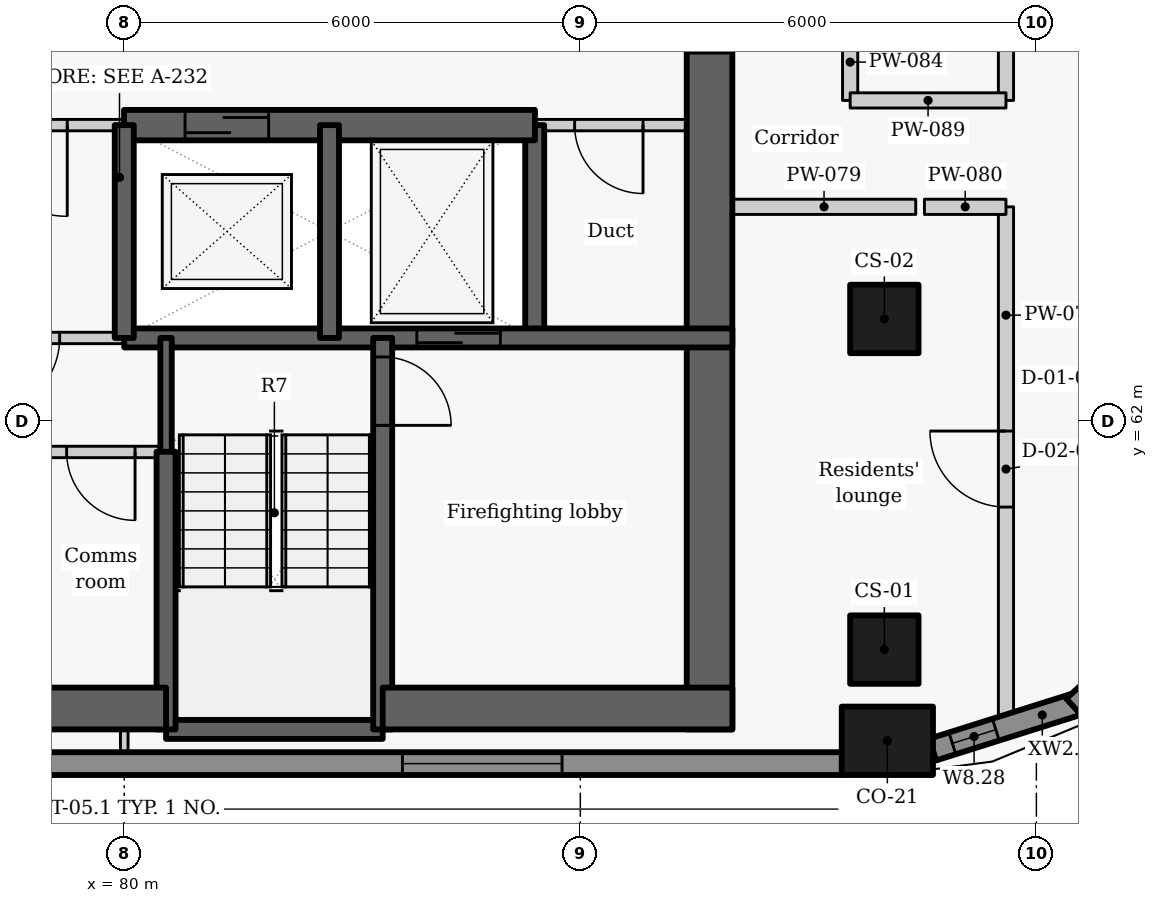
"""IFC4 building model, lengths in metres.
Left out: names, types, materials, properties, quantities, classifications, styles, units other than length and angle.
Written with IfcOpenShell. Run it as: python <this file> out.ifc"""

import sys

from ifc_helpers import new_model, si_unit, direction, frame, frame_2d, origin, origin_2d, place, context, subcontext, project, spatial, rectangle, extrude, element, fill, save


model = new_model("IFC4")
c1 = context("Model", 3, precision=1e-05, world=origin(), true_north=direction((0.0, 1.0)))
c2 = subcontext(c1, "Body", "Model", "MODEL_VIEW")
j1 = project(units=[si_unit("LENGTHUNIT", "METRE"), si_unit("PLANEANGLEUNIT", "RADIAN")], contexts=[c1])
p1 = place(None, origin())
s1 = spatial("IfcSite", under=j1, at=p1, CompositionType="ELEMENT")
p2 = place(p1, origin())
s2 = spatial("IfcBuilding", under=s1, at=p2, CompositionType="ELEMENT")
p3 = place(p2, frame((0.0, 0.0, 180.0)))
s3 = spatial("IfcBuildingStorey", under=s2, at=p3, CompositionType="ELEMENT", Elevation=180.0)
p4 = place(p3, frame((90.04, 57.8, 0.0), z_axis=(0.0, 0.0, 1.0), x_axis=(1.0, 0.0, 0.0)))
e1 = element("IfcColumn", 1, at=p4, inside=s3, PredefinedType="COLUMN", context=c2, shape_type="SweptSolid", body=[
    extrude(rectangle(XDim=1.2, YDim=0.9, at=origin_2d()), origin(), (0.0, 0.0, 1.0), 3.3),
])
for number, where, z_axis, x_axis in (
    (2, (90.0, 59.0, 0.0), (0.0, 0.0, 1.0), (0.0, 1.0, 0.0)),
    (3, (90.0, 63.35, 0.0), (0.0, 0.0, 1.0), (0.0, 1.0, 0.0)),
):
    element("IfcColumn", number, at=place(p3, frame(where, z_axis=z_axis, x_axis=x_axis)), inside=s3, PredefinedType="COLUMN", context=c2, shape_type="SweptSolid", body=[
        extrude(rectangle(XDim=0.9, YDim=0.9, at=origin_2d()), origin(), (0.0, 0.0, 1.0), 3.3),
    ])
p5 = place(p3, frame((70.551, 57.5, 0.0), z_axis=(0.0, 0.0, 1.0), x_axis=(1.0, 0.0, 0.0)))
e4 = element("IfcWall", 4, at=p5, inside=s3, PredefinedType="SOLIDWALL", context=c2, shape_type="SweptSolid", body=[
    extrude(rectangle(XDim=18.893, YDim=0.3, at=frame_2d((9.446, 0.0))), origin(), (0.0, 0.0, 1.0), 2.425),
])
p6 = place(p5, frame((3.687, 0.0, 0.9)))
e5 = element("IfcOpeningElement", 5, at=p6, cuts=e4, PredefinedType="OPENING", context=c2, shape_type="SweptSolid", body=[
    extrude(rectangle(XDim=2.1, YDim=1.1, at=frame_2d((1.05, 0.55))), frame((0.0, 0.16, 0.0), z_axis=(0.0, -1.0, 0.0), x_axis=(1.0, 0.0, 0.0)), (0.0, 0.0, 1.0), 0.32),
])
p7 = place(p5, frame((13.109, 0.0, 0.9)))
e6 = element("IfcOpeningElement", 6, at=p7, cuts=e4, PredefinedType="OPENING", context=c2, shape_type="SweptSolid", body=[
    extrude(rectangle(XDim=2.1, YDim=1.1, at=frame_2d((1.05, 0.55))), frame((0.0, 0.16, 0.0), z_axis=(0.0, -1.0, 0.0), x_axis=(1.0, 0.0, 0.0)), (0.0, 0.0, 1.0), 0.32),
])
p8 = place(p3, frame((90.636, 57.685, 0.0), z_axis=(0.0, 0.0, 1.0), x_axis=(0.95368324118, 0.300812691707, 0.0)))
e7 = element("IfcWall", 7, at=p8, inside=s3, PredefinedType="SOLIDWALL", context=c2, shape_type="SweptSolid", body=[
    extrude(rectangle(XDim=2.053, YDim=0.3, at=frame_2d((1.027, 0.0))), origin(), (0.0, 0.0, 1.0), 2.425),
])
p9 = place(p8, frame((0.271, 0.0, 0.9)))
e8 = element("IfcOpeningElement", 8, at=p9, cuts=e7, PredefinedType="OPENING", context=c2, shape_type="SweptSolid", body=[
    extrude(rectangle(XDim=0.6, YDim=1.1, at=frame_2d((0.3, 0.55))), frame((0.0, 0.16, 0.0), z_axis=(0.0, -1.0, 0.0), x_axis=(1.0, 0.0, 0.0)), (0.0, 0.0, 1.0), 0.32),
])
p10 = place(p3, frame((92.494, 58.244, 0.0), z_axis=(0.0, 0.0, 1.0), x_axis=(0.73764876128, 0.675184645102, 0.0)))
e9 = element("IfcWall", 9, at=p10, inside=s3, PredefinedType="SOLIDWALL", context=c2, shape_type="SweptSolid", body=[
    extrude(rectangle(XDim=2.048, YDim=0.3, at=frame_2d((1.024, 0.0))), origin(), (0.0, 0.0, 1.0), 2.425),
])
p11 = place(p3, frame((85.4, 63.1, -0.275), z_axis=(0.0, 0.0, 1.0), x_axis=(0.0, 1.0, 0.0)))
e10 = element("IfcWall", 10, at=p11, inside=s3, PredefinedType="SHEAR", context=c2, shape_type="SweptSolid", body=[
    extrude(rectangle(XDim=2.8, YDim=0.25, at=frame_2d((1.4, 0.0))), origin(), (0.0, 0.0, 1.0), 3.3),
])
p12 = place(p3, frame((87.7, 72.2, -0.275), z_axis=(0.0, 0.0, 1.0), x_axis=(0.0, -1.0, 0.0)))
e11 = element("IfcWall", 11, at=p12, inside=s3, PredefinedType="SHEAR", context=c2, shape_type="SweptSolid", body=[
    extrude(rectangle(XDim=14.25, YDim=0.6, at=frame_2d((7.125, 0.0))), origin(), (0.0, 0.0, 1.0), 3.3),
])
p13 = place(p12, frame((3.852, 0.0, 0.275)))
e12 = element("IfcOpeningElement", 12, at=p13, cuts=e11, PredefinedType="OPENING", context=c2, shape_type="SweptSolid", body=[
    extrude(rectangle(XDim=1.5, YDim=2.1, at=frame_2d((0.75, 1.05))), frame((0.0, 0.31, 0.0), z_axis=(0.0, -1.0, 0.0), x_axis=(1.0, 0.0, 0.0)), (0.0, 0.0, 1.0), 0.62),
])
p14 = place(p3, frame((80.003, 65.9, 0.0), z_axis=(0.0, 0.0, 1.0), x_axis=(-1.0, 0.0, 0.0)))
e13 = element("IfcWall", 13, at=p14, inside=s3, PredefinedType="PARTITIONING", context=c2, shape_type="SweptSolid", body=[
    extrude(rectangle(XDim=2.706, YDim=0.15, at=frame_2d((1.353, 0.0))), origin(), (0.0, 0.0, 1.0), 3.025),
])
p15 = place(p14, frame((0.753, 0.0, 0.0)))
e14 = element("IfcOpeningElement", 14, at=p15, cuts=e13, PredefinedType="OPENING", context=c2, shape_type="SweptSolid", body=[
    extrude(rectangle(XDim=1.2, YDim=2.1, at=frame_2d((0.6, 1.05))), frame((0.0, 0.085, 0.0), z_axis=(0.0, -1.0, 0.0), x_axis=(1.0, 0.0, 0.0)), (0.0, 0.0, 1.0), 0.17),
])
p16 = place(p3, frame((88.0, 65.9, 0.0), z_axis=(0.0, 0.0, 1.0), x_axis=(-1.0, 0.0, 0.0)))
e15 = element("IfcWall", 15, at=p16, inside=s3, PredefinedType="PARTITIONING", context=c2, shape_type="SweptSolid", body=[
    extrude(rectangle(XDim=2.603, YDim=0.15, at=frame_2d((1.302, 0.0))), origin(), (0.0, 0.0, 1.0), 3.025),
])
p17 = place(p16, frame((1.175, 0.0, 0.0)))
e16 = element("IfcOpeningElement", 16, at=p17, cuts=e15, PredefinedType="OPENING", context=c2, shape_type="SweptSolid", body=[
    extrude(rectangle(XDim=0.9, YDim=2.1, at=frame_2d((0.45, 1.05))), frame((0.0, 0.085, 0.0), z_axis=(0.0, -1.0, 0.0), x_axis=(1.0, 0.0, 0.0)), (0.0, 0.0, 1.0), 0.17),
])
p18 = place(p3, frame((79.997, 65.9, -0.275), z_axis=(0.0, 0.0, 1.0), x_axis=(1.0, 0.0, 0.0)))
e17 = element("IfcWall", 17, at=p18, inside=s3, PredefinedType="SHEAR", context=c2, shape_type="SweptSolid", body=[
    extrude(rectangle(XDim=5.406, YDim=0.4, at=frame_2d((2.703, 0.0))), origin(), (0.0, 0.0, 1.0), 3.3),
])
p19 = place(p18, frame((0.803, 0.0, 0.275)))
e18 = element("IfcOpeningElement", 18, at=p19, cuts=e17, PredefinedType="OPENING", context=c2, shape_type="SweptSolid", body=[
    extrude(rectangle(XDim=1.1, YDim=2.1, at=frame_2d((0.55, 1.05))), frame((0.0, 0.21, 0.0), z_axis=(0.0, -1.0, 0.0), x_axis=(1.0, 0.0, 0.0)), (0.0, 0.0, 1.0), 0.42),
])
p20 = place(p3, frame((80.0, 63.1, -0.275), z_axis=(0.0, 0.0, 1.0), x_axis=(1.0, 0.0, 0.0)))
e19 = element("IfcWall", 19, at=p20, inside=s3, PredefinedType="SHEAR", context=c2, shape_type="SweptSolid", body=[
    extrude(rectangle(XDim=8.0, YDim=0.25, at=frame_2d((4.0, 0.0))), origin(), (0.0, 0.0, 1.0), 3.3),
])
p21 = place(p20, frame((3.849, 0.0, 0.275)))
e20 = element("IfcOpeningElement", 20, at=p21, cuts=e19, PredefinedType="OPENING", context=c2, shape_type="SweptSolid", body=[
    extrude(rectangle(XDim=1.1, YDim=2.1, at=frame_2d((0.55, 1.05))), frame((0.0, 0.135, 0.0), z_axis=(0.0, -1.0, 0.0), x_axis=(1.0, 0.0, 0.0)), (0.0, 0.0, 1.0), 0.27),
])
p22 = place(p3, frame((80.0, 63.1, -0.275), z_axis=(0.0, 0.0, 1.0), x_axis=(0.0, 1.0, 0.0)))
e21 = element("IfcWall", 21, at=p22, inside=s3, PredefinedType="SHEAR", context=c2, shape_type="SweptSolid", body=[
    extrude(rectangle(XDim=2.8, YDim=0.25, at=frame_2d((1.4, 0.0))), origin(), (0.0, 0.0, 1.0), 3.3),
])
p23 = place(p3, frame((80.0, 63.1, 0.0), z_axis=(0.0, 0.0, 1.0), x_axis=(-1.0, 0.0, 0.0)))
e22 = element("IfcWall", 22, at=p23, inside=s3, PredefinedType="PARTITIONING", context=c2, shape_type="SweptSolid", body=[
    extrude(rectangle(XDim=2.7, YDim=0.15, at=frame_2d((1.35, 0.0))), origin(), (0.0, 0.0, 1.0), 3.025),
])
p24 = place(p23, frame((0.85, 0.0, 0.0)))
e23 = element("IfcOpeningElement", 23, at=p24, cuts=e22, PredefinedType="OPENING", context=c2, shape_type="SweptSolid", body=[
    extrude(rectangle(XDim=1.0, YDim=2.1, at=frame_2d((0.5, 1.05))), frame((0.0, 0.085, 0.0), z_axis=(0.0, -1.0, 0.0), x_axis=(1.0, 0.0, 0.0)), (0.0, 0.0, 1.0), 0.17),
])
p25 = place(p3, frame((82.7, 63.1, -0.275), z_axis=(0.0, 0.0, 1.0), x_axis=(0.0, 1.0, 0.0)))
e24 = element("IfcWall", 24, at=p25, inside=s3, PredefinedType="SHEAR", context=c2, shape_type="SweptSolid", body=[
    extrude(rectangle(XDim=2.8, YDim=0.25, at=frame_2d((1.4, 0.0))), origin(), (0.0, 0.0, 1.0), 3.3),
])
p26 = place(p3, frame((80.55, 57.95, -0.275), z_axis=(0.0, 0.0, 1.0), x_axis=(1.0, 0.0, 0.0)))
e25 = element("IfcWall", 25, at=p26, inside=s3, PredefinedType="SHEAR", context=c2, shape_type="SweptSolid", body=[
    extrude(rectangle(XDim=2.85, YDim=0.25, at=frame_2d((1.425, 0.0))), origin(), (0.0, 0.0, 1.0), 3.3),
])
p27 = place(p3, frame((83.4, 63.1, -0.275), z_axis=(0.0, 0.0, 1.0), x_axis=(0.0, -1.0, 0.0)))
e26 = element("IfcWall", 26, at=p27, inside=s3, PredefinedType="SHEAR", context=c2, shape_type="SweptSolid", body=[
    extrude(rectangle(XDim=5.15, YDim=0.25, at=frame_2d((2.575, 0.0))), origin(), (0.0, 0.0, 1.0), 3.3),
])
p28 = place(p27, frame((0.25, 0.0, 0.275)))
e27 = element("IfcOpeningElement", 27, at=p28, cuts=e26, PredefinedType="OPENING", context=c2, shape_type="SweptSolid", body=[
    extrude(rectangle(XDim=0.9, YDim=2.1, at=frame_2d((0.45, 1.05))), frame((0.0, 0.135, 0.0), z_axis=(0.0, -1.0, 0.0), x_axis=(1.0, 0.0, 0.0)), (0.0, 0.0, 1.0), 0.27),
])
p29 = place(p3, frame((80.55, 61.597, -0.275), z_axis=(0.0, 0.0, 1.0), x_axis=(0.0, 1.0, 0.0)))
e28 = element("IfcWall", 28, at=p29, inside=s3, PredefinedType="SHEAR", context=c2, shape_type="SweptSolid", body=[
    extrude(rectangle(XDim=1.503, YDim=0.15, at=frame_2d((0.751, 0.0))), origin(), (0.0, 0.0, 1.0), 3.3),
])
p30 = place(p3, frame((80.55, 57.95, -0.275), z_axis=(0.0, 0.0, 1.0), x_axis=(0.0, 1.0, 0.0)))
e29 = element("IfcWall", 29, at=p30, inside=s3, PredefinedType="SHEAR", context=c2, shape_type="SweptSolid", body=[
    extrude(rectangle(XDim=3.653, YDim=0.25, at=frame_2d((1.827, 0.0))), origin(), (0.0, 0.0, 1.0), 3.3),
])
p31 = place(p3, frame((75.35, 58.225, -0.275), z_axis=(0.0, 0.0, 1.0), x_axis=(1.0, 0.0, 0.0)))
e30 = element("IfcWall", 30, at=p31, inside=s3, PredefinedType="SHEAR", context=c2, shape_type="SweptSolid", body=[
    extrude(rectangle(XDim=5.2, YDim=0.55, at=frame_2d((2.6, 0.0))), origin(), (0.0, 0.0, 1.0), 3.3),
])
p32 = place(p3, frame((83.4, 58.225, -0.275), z_axis=(0.0, 0.0, 1.0), x_axis=(1.0, 0.0, 0.0)))
e31 = element("IfcWall", 31, at=p32, inside=s3, PredefinedType="SHEAR", context=c2, shape_type="SweptSolid", body=[
    extrude(rectangle(XDim=4.6, YDim=0.55, at=frame_2d((2.3, 0.0))), origin(), (0.0, 0.0, 1.0), 3.3),
])
p33 = place(p3, frame((80.55, 61.6, 0.0), z_axis=(0.0, 0.0, 1.0), x_axis=(-1.0, 0.0, 0.0)))
e32 = element("IfcWall", 32, at=p33, inside=s3, PredefinedType="PARTITIONING", context=c2, shape_type="SweptSolid", body=[
    extrude(rectangle(XDim=5.2, YDim=0.15, at=frame_2d((2.6, 0.0))), origin(), (0.0, 0.0, 1.0), 3.025),
])
p34 = place(p33, frame((3.866, 0.0, 0.0)))
e33 = element("IfcOpeningElement", 33, at=p34, cuts=e32, PredefinedType="OPENING", context=c2, shape_type="SweptSolid", body=[
    extrude(rectangle(XDim=0.9, YDim=2.1, at=frame_2d((0.45, 1.05))), frame((0.0, 0.085, 0.0), z_axis=(0.0, -1.0, 0.0), x_axis=(1.0, 0.0, 0.0)), (0.0, 0.0, 1.0), 0.17),
])
p35 = place(p33, frame((2.124, 0.0, 0.0)))
e34 = element("IfcOpeningElement", 34, at=p35, cuts=e32, PredefinedType="OPENING", context=c2, shape_type="SweptSolid", body=[
    extrude(rectangle(XDim=0.9, YDim=2.1, at=frame_2d((0.45, 1.05))), frame((0.0, 0.085, 0.0), z_axis=(0.0, -1.0, 0.0), x_axis=(1.0, 0.0, 0.0)), (0.0, 0.0, 1.0), 0.17),
])
p36 = place(p33, frame((0.408, 0.0, 0.0)))
e35 = element("IfcOpeningElement", 35, at=p36, cuts=e32, PredefinedType="OPENING", context=c2, shape_type="SweptSolid", body=[
    extrude(rectangle(XDim=0.9, YDim=2.1, at=frame_2d((0.45, 1.05))), frame((0.0, 0.085, 0.0), z_axis=(0.0, -1.0, 0.0), x_axis=(1.0, 0.0, 0.0)), (0.0, 0.0, 1.0), 0.17),
])
p37 = place(p3, frame((91.6, 57.926, 0.0), z_axis=(0.0, 0.0, 1.0), x_axis=(0.0, 1.0, 0.0)))
e36 = element("IfcWall", 36, at=p37, inside=s3, PredefinedType="PARTITIONING", context=c2, shape_type="SweptSolid", body=[
    extrude(rectangle(XDim=6.899, YDim=0.2, at=frame_2d((3.449, 0.0))), origin(), (0.0, 0.0, 1.0), 2.405),
])
p38 = place(p37, frame((2.949, 0.0, 0.0)))
e37 = element("IfcOpeningElement", 37, at=p38, cuts=e36, PredefinedType="OPENING", context=c2, shape_type="SweptSolid", body=[
    extrude(rectangle(XDim=1.0, YDim=2.1, at=frame_2d((0.5, 1.05))), frame((0.0, 0.11, 0.0), z_axis=(0.0, -1.0, 0.0), x_axis=(1.0, 0.0, 0.0)), (0.0, 0.0, 1.0), 0.22),
])
p39 = place(p3, frame((91.6, 66.225, 0.0), z_axis=(0.0, 0.0, 1.0), x_axis=(0.0, 1.0, 0.0)))
e38 = element("IfcWall", 38, at=p39, inside=s3, PredefinedType="PARTITIONING", context=c2, shape_type="SweptSolid", body=[
    extrude(rectangle(XDim=5.298, YDim=0.2, at=frame_2d((2.649, 0.0))), origin(), (0.0, 0.0, 1.0), 3.025),
])
p40 = place(p3, frame((88.0, 64.825, 0.0), z_axis=(0.0, 0.0, 1.0), x_axis=(1.0, 0.0, 0.0)))
e39 = element("IfcWall", 39, at=p40, inside=s3, PredefinedType="PARTITIONING", context=c2, shape_type="SweptSolid", body=[
    extrude(rectangle(XDim=2.413, YDim=0.2, at=frame_2d((1.207, 0.0))), origin(), (0.0, 0.0, 1.0), 2.505),
])
p41 = place(p3, frame((90.527, 64.825, 0.0), z_axis=(0.0, 0.0, 1.0), x_axis=(1.0, 0.0, 0.0)))
e40 = element("IfcWall", 40, at=p41, inside=s3, PredefinedType="PARTITIONING", context=c2, shape_type="SweptSolid", body=[
    extrude(rectangle(XDim=1.073, YDim=0.2, at=frame_2d((0.537, 0.0))), origin(), (0.0, 0.0, 1.0), 3.025),
])
p42 = place(p3, frame((89.55, 66.225, 0.0), z_axis=(0.0, 0.0, 1.0), x_axis=(0.0, 1.0, 0.0)))
e41 = element("IfcWall", 41, at=p42, inside=s3, PredefinedType="PARTITIONING", context=c2, shape_type="SweptSolid", body=[
    extrude(rectangle(XDim=1.008, YDim=0.2, at=frame_2d((0.504, 0.0))), origin(), (0.0, 0.0, 1.0), 3.025),
])
p43 = place(p3, frame((89.55, 66.225, 0.0), z_axis=(0.0, 0.0, 1.0), x_axis=(1.0, 0.0, 0.0)))
e42 = element("IfcWall", 42, at=p43, inside=s3, PredefinedType="PARTITIONING", context=c2, shape_type="SweptSolid", body=[
    extrude(rectangle(XDim=2.05, YDim=0.2, at=frame_2d((1.025, 0.0))), origin(), (0.0, 0.0, 1.0), 2.505),
])
p44 = place(p3, frame((80.0, 57.65, 0.0), z_axis=(0.0, 0.0, 1.0), x_axis=(0.0, 1.0, 0.0)))
e43 = element("IfcWall", 43, at=p44, inside=s3, PredefinedType="PARTITIONING", context=c2, shape_type="SweptSolid", body=[
    extrude(rectangle(XDim=0.3, YDim=0.1, at=frame_2d((0.15, 0.0))), origin(), (0.0, 0.0, 1.0), 3.025),
])
p45 = place(p7, origin())
e44 = element("IfcWindow", 44, at=p45, inside=s3, PartitioningType="SINGLE_PANEL", PredefinedType="WINDOW", context=c2, shape_type="SweptSolid", body=[
    extrude(rectangle(XDim=2.1, YDim=1.1, at=frame_2d((1.05, 0.55))), frame((0.0, 0.03, 0.0), z_axis=(0.0, -1.0, 0.0), x_axis=(1.0, 0.0, 0.0)), (0.0, 0.0, 1.0), 0.06),
])
fill(e6, e44)
p46 = place(p9, origin())
e45 = element("IfcWindow", 45, at=p46, inside=s3, PartitioningType="SINGLE_PANEL", PredefinedType="WINDOW", context=c2, shape_type="SweptSolid", body=[
    extrude(rectangle(XDim=0.6, YDim=1.1, at=frame_2d((0.3, 0.55))), frame((0.0, 0.03, 0.0), z_axis=(0.0, -1.0, 0.0), x_axis=(1.0, 0.0, 0.0)), (0.0, 0.0, 1.0), 0.06),
])
fill(e8, e45)
p47 = place(p15, origin())
e46 = element("IfcDoor", 46, at=p47, inside=s3, OperationType="DOUBLE_DOOR_SINGLE_SWING", PredefinedType="DOOR", context=c2, shape_type="SweptSolid", body=[
    extrude(rectangle(XDim=1.2, YDim=2.1, at=frame_2d((0.6, 1.05))), frame((0.0, 0.025, 0.0), z_axis=(0.0, -1.0, 0.0), x_axis=(1.0, 0.0, 0.0)), (0.0, 0.0, 1.0), 0.05),
])
fill(e14, e46)
p48 = place(p19, origin())
e47 = element("IfcDoor", 47, at=p48, inside=s3, OperationType="SLIDING_TO_LEFT", PredefinedType="DOOR", context=c2, shape_type="SweptSolid", body=[
    extrude(rectangle(XDim=1.1, YDim=2.1, at=frame_2d((0.55, 1.05))), frame((0.0, 0.025, 0.0), z_axis=(0.0, -1.0, 0.0), x_axis=(1.0, 0.0, 0.0)), (0.0, 0.0, 1.0), 0.05),
])
fill(e18, e47)
p49 = place(p21, origin())
e48 = element("IfcDoor", 48, at=p49, inside=s3, OperationType="SLIDING_TO_LEFT", PredefinedType="DOOR", context=c2, shape_type="SweptSolid", body=[
    extrude(rectangle(XDim=1.1, YDim=2.1, at=frame_2d((0.55, 1.05))), frame((0.0, 0.025, 0.0), z_axis=(0.0, -1.0, 0.0), x_axis=(1.0, 0.0, 0.0)), (0.0, 0.0, 1.0), 0.05),
])
fill(e20, e48)
p50 = place(p17, origin())
e49 = element("IfcDoor", 49, at=p50, inside=s3, OperationType="SINGLE_SWING_LEFT", PredefinedType="DOOR", context=c2, shape_type="SweptSolid", body=[
    extrude(rectangle(XDim=0.9, YDim=2.1, at=frame_2d((0.45, 1.05))), frame((0.0, 0.025, 0.0), z_axis=(0.0, -1.0, 0.0), x_axis=(1.0, 0.0, 0.0)), (0.0, 0.0, 1.0), 0.05),
])
fill(e16, e49)
p51 = place(p24, origin())
e50 = element("IfcDoor", 50, at=p51, inside=s3, OperationType="SINGLE_SWING_RIGHT", PredefinedType="DOOR", context=c2, shape_type="SweptSolid", body=[
    extrude(rectangle(XDim=1.0, YDim=2.1, at=frame_2d((0.5, 1.05))), frame((0.0, 0.025, 0.0), z_axis=(0.0, -1.0, 0.0), x_axis=(1.0, 0.0, 0.0)), (0.0, 0.0, 1.0), 0.05),
])
fill(e23, e50)
p52 = place(p36, origin())
e51 = element("IfcDoor", 51, at=p52, inside=s3, OperationType="SINGLE_SWING_LEFT", PredefinedType="DOOR", context=c2, shape_type="SweptSolid", body=[
    extrude(rectangle(XDim=0.9, YDim=2.1, at=frame_2d((0.45, 1.05))), frame((0.0, 0.025, 0.0), z_axis=(0.0, -1.0, 0.0), x_axis=(1.0, 0.0, 0.0)), (0.0, 0.0, 1.0), 0.05),
])
fill(e35, e51)
p53 = place(p28, origin())
e52 = element("IfcDoor", 52, at=p53, inside=s3, OperationType="SINGLE_SWING_RIGHT", PredefinedType="DOOR", context=c2, shape_type="SweptSolid", body=[
    extrude(rectangle(XDim=0.9, YDim=2.1, at=frame_2d((0.45, 1.05))), frame((0.0, 0.025, 0.0), z_axis=(0.0, -1.0, 0.0), x_axis=(1.0, 0.0, 0.0)), (0.0, 0.0, 1.0), 0.05),
])
fill(e27, e52)
p54 = place(p38, origin())
e53 = element("IfcDoor", 53, at=p54, inside=s3, OperationType="SINGLE_SWING_RIGHT", PredefinedType="DOOR", context=c2, shape_type="SweptSolid", body=[
    extrude(rectangle(XDim=1.0, YDim=2.1, at=frame_2d((0.5, 1.05))), frame((0.0, 0.025, 0.0), z_axis=(0.0, -1.0, 0.0), x_axis=(1.0, 0.0, 0.0)), (0.0, 0.0, 1.0), 0.05),
])
fill(e37, e53)
p55 = place(p13, origin())
e54 = element("IfcDoor", 54, at=p55, inside=s3, OperationType="DOUBLE_DOOR_SINGLE_SWING", PredefinedType="DOOR", context=c2, shape_type="SweptSolid", body=[
    extrude(rectangle(XDim=1.5, YDim=2.1, at=frame_2d((0.75, 1.05))), frame((0.0, 0.025, 0.0), z_axis=(0.0, -1.0, 0.0), x_axis=(1.0, 0.0, 0.0)), (0.0, 0.0, 1.0), 0.05),
])
fill(e12, e54)
save(model, sys.argv[1])
